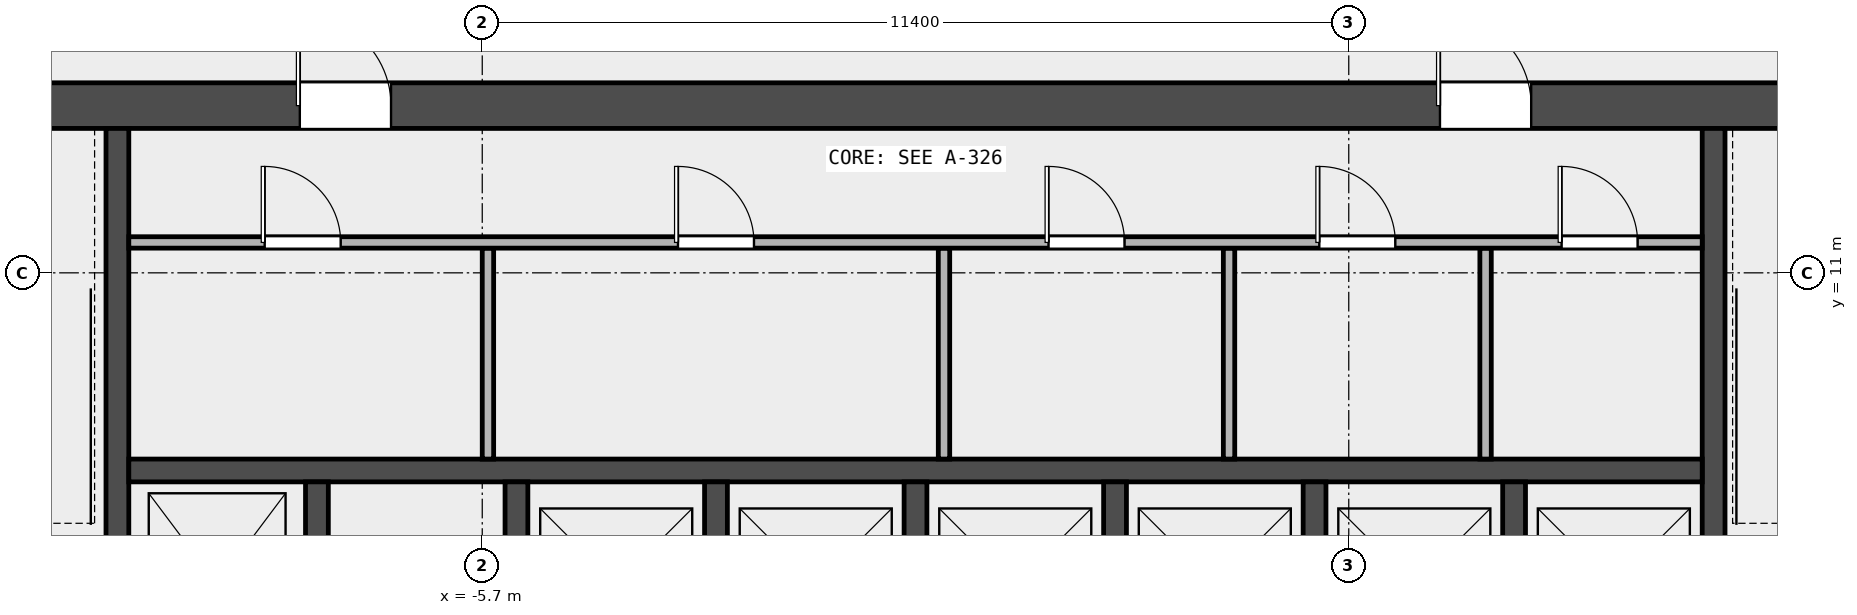
"""IFC4 building model, lengths in metres.
Left out: names, types, materials, properties, quantities, classifications, styles, units other than length and angle.
Written with IfcOpenShell. Run it as: python <this file> out.ifc"""

import sys

from ifc_helpers import new_model, si_unit, direction, frame, frame_2d, origin, place, context, subcontext, project, spatial, rectangle, extrude, element, fill, save


model = new_model("IFC4")
c1 = context("Model", 3, precision=1e-05, world=origin(), true_north=direction((0.0, 1.0)))
c2 = subcontext(c1, "Body", "Model", "MODEL_VIEW")
j1 = project(units=[si_unit("LENGTHUNIT", "METRE"), si_unit("PLANEANGLEUNIT", "RADIAN")], contexts=[c1])
p1 = place(None, origin())
s1 = spatial("IfcSite", under=j1, at=p1, CompositionType="ELEMENT")
p2 = place(p1, origin())
s2 = spatial("IfcBuilding", under=s1, at=p2, CompositionType="ELEMENT")
p3 = place(p2, frame((0.0, 0.0, 271.4)))
s3 = spatial("IfcBuildingStorey", under=s2, at=p3, CompositionType="ELEMENT", Elevation=271.4)
p4 = place(p3, frame((-14.4, 13.2, 0.0), z_axis=(0.0, 0.0, 1.0), x_axis=(1.0, 0.0, 0.0)))
e1 = element("IfcWall", 1, at=p4, inside=s3, PredefinedType="SHEAR", context=c2, shape_type="SweptSolid", body=[
    extrude(rectangle(XDim=28.8, YDim=0.6, at=frame_2d((14.4, 0.0))), origin(), (0.0, 0.0, 1.0), 3.7),
])
p5 = place(p4, frame((6.3, 0.0, 0.0)))
e2 = element("IfcOpeningElement", 2, at=p5, cuts=e1, PredefinedType="OPENING", context=c2, shape_type="SweptSolid", body=[
    extrude(rectangle(XDim=1.2, YDim=2.1, at=frame_2d((0.6, 1.05))), frame((0.0, 0.312, 0.0), z_axis=(0.0, -1.0, 0.0), x_axis=(1.0, 0.0, 0.0)), (0.0, 0.0, 1.0), 0.624),
])
p6 = place(p4, frame((21.3, 0.0, 0.0)))
e3 = element("IfcOpeningElement", 3, at=p6, cuts=e1, PredefinedType="OPENING", context=c2, shape_type="SweptSolid", body=[
    extrude(rectangle(XDim=1.2, YDim=2.1, at=frame_2d((0.6, 1.05))), frame((0.0, 0.312, 0.0), z_axis=(0.0, -1.0, 0.0), x_axis=(1.0, 0.0, 0.0)), (0.0, 0.0, 1.0), 0.624),
])
for number, where, z_axis, x_axis in (
    (4, (-10.5, 5.25, 0.0), (0.0, 0.0, 1.0), (0.0, 1.0, 0.0)),
    (5, (10.5, 5.25, 0.0), (0.0, 0.0, 1.0), (0.0, 1.0, 0.0)),
):
    element("IfcWall", number, at=place(p3, frame(where, z_axis=z_axis, x_axis=x_axis)), inside=s3, PredefinedType="SHEAR", context=c2, shape_type="SweptSolid", body=[
        extrude(rectangle(XDim=7.65, YDim=0.3, at=frame_2d((3.825, 0.0))), origin(), (0.0, 0.0, 1.0), 3.7),
    ])
p7 = place(p3, frame((-10.35, 8.4, 0.0), z_axis=(0.0, 0.0, 1.0), x_axis=(1.0, 0.0, 0.0)))
e6 = element("IfcWall", 6, at=p7, inside=s3, PredefinedType="SOLIDWALL", context=c2, shape_type="SweptSolid", body=[
    extrude(rectangle(XDim=20.7, YDim=0.3, at=frame_2d((10.35, 0.0))), origin(), (0.0, 0.0, 1.0), 3.7),
])
for number, where, z_axis, x_axis in (
    (7, (-7.875, 5.55, 0.0), (0.0, 0.0, 1.0), (0.0, 1.0, 0.0)),
    (8, (-5.25, 5.55, 0.0), (0.0, 0.0, 1.0), (0.0, 1.0, 0.0)),
    (9, (-2.625, 5.55, 0.0), (0.0, 0.0, 1.0), (0.0, 1.0, 0.0)),
    (10, (0.0, 5.55, 0.0), (0.0, 0.0, 1.0), (0.0, 1.0, 0.0)),
    (11, (2.625, 5.55, 0.0), (0.0, 0.0, 1.0), (0.0, 1.0, 0.0)),
    (12, (5.25, 5.55, 0.0), (0.0, 0.0, 1.0), (0.0, 1.0, 0.0)),
    (13, (7.875, 5.55, 0.0), (0.0, 0.0, 1.0), (0.0, 1.0, 0.0)),
):
    element("IfcWall", number, at=place(p3, frame(where, z_axis=z_axis, x_axis=x_axis)), inside=s3, PredefinedType="SOLIDWALL", context=c2, shape_type="SweptSolid", body=[
        extrude(rectangle(XDim=2.7, YDim=0.3, at=frame_2d((1.35, 0.0))), origin(), (0.0, 0.0, 1.0), 3.7),
    ])
for number, where, z_axis, x_axis in (
    (14, (-5.625, 8.55, 0.0), (0.0, 0.0, 1.0), (0.0, 1.0, 0.0)),
    (15, (0.375, 8.55, 0.0), (0.0, 0.0, 1.0), (0.0, 1.0, 0.0)),
    (16, (4.125, 8.55, 0.0), (0.0, 0.0, 1.0), (0.0, 1.0, 0.0)),
    (17, (7.5, 8.55, 0.0), (0.0, 0.0, 1.0), (0.0, 1.0, 0.0)),
):
    element("IfcWall", number, at=place(p3, frame(where, z_axis=z_axis, x_axis=x_axis)), inside=s3, PredefinedType="PARTITIONING", context=c2, shape_type="SweptSolid", body=[
        extrude(rectangle(XDim=2.775, YDim=0.15, at=frame_2d((1.387, 0.0))), origin(), (0.0, 0.0, 1.0), 3.7),
    ])
p8 = place(p3, frame((-10.35, 11.4, 0.0), z_axis=(0.0, 0.0, 1.0), x_axis=(1.0, 0.0, 0.0)))
e18 = element("IfcWall", 18, at=p8, inside=s3, PredefinedType="PARTITIONING", context=c2, shape_type="SweptSolid", body=[
    extrude(rectangle(XDim=20.7, YDim=0.15, at=frame_2d((10.35, 0.0))), origin(), (0.0, 0.0, 1.0), 3.7),
])
p9 = place(p8, frame((1.788, 0.0, 0.0)))
e19 = element("IfcOpeningElement", 19, at=p9, cuts=e18, PredefinedType="OPENING", context=c2, shape_type="SweptSolid", body=[
    extrude(rectangle(XDim=1.0, YDim=2.1, at=frame_2d((0.5, 1.05))), frame((0.0, 0.087, 0.0), z_axis=(0.0, -1.0, 0.0), x_axis=(1.0, 0.0, 0.0)), (0.0, 0.0, 1.0), 0.174),
])
p10 = place(p8, frame((7.225, 0.0, 0.0)))
e20 = element("IfcOpeningElement", 20, at=p10, cuts=e18, PredefinedType="OPENING", context=c2, shape_type="SweptSolid", body=[
    extrude(rectangle(XDim=1.0, YDim=2.1, at=frame_2d((0.5, 1.05))), frame((0.0, 0.087, 0.0), z_axis=(0.0, -1.0, 0.0), x_axis=(1.0, 0.0, 0.0)), (0.0, 0.0, 1.0), 0.174),
])
p11 = place(p8, frame((12.1, 0.0, 0.0)))
e21 = element("IfcOpeningElement", 21, at=p11, cuts=e18, PredefinedType="OPENING", context=c2, shape_type="SweptSolid", body=[
    extrude(rectangle(XDim=1.0, YDim=2.1, at=frame_2d((0.5, 1.05))), frame((0.0, 0.087, 0.0), z_axis=(0.0, -1.0, 0.0), x_axis=(1.0, 0.0, 0.0)), (0.0, 0.0, 1.0), 0.174),
])
p12 = place(p8, frame((15.663, 0.0, 0.0)))
e22 = element("IfcOpeningElement", 22, at=p12, cuts=e18, PredefinedType="OPENING", context=c2, shape_type="SweptSolid", body=[
    extrude(rectangle(XDim=1.0, YDim=2.1, at=frame_2d((0.5, 1.05))), frame((0.0, 0.087, 0.0), z_axis=(0.0, -1.0, 0.0), x_axis=(1.0, 0.0, 0.0)), (0.0, 0.0, 1.0), 0.174),
])
p13 = place(p8, frame((18.85, 0.0, 0.0)))
e23 = element("IfcOpeningElement", 23, at=p13, cuts=e18, PredefinedType="OPENING", context=c2, shape_type="SweptSolid", body=[
    extrude(rectangle(XDim=1.0, YDim=2.1, at=frame_2d((0.5, 1.05))), frame((0.0, 0.087, 0.0), z_axis=(0.0, -1.0, 0.0), x_axis=(1.0, 0.0, 0.0)), (0.0, 0.0, 1.0), 0.174),
])
p14 = place(p9, origin())
e24 = element("IfcDoor", 24, at=p14, inside=s3, OperationType="SINGLE_SWING_LEFT", PredefinedType="DOOR", context=c2, shape_type="SweptSolid", body=[
    extrude(rectangle(XDim=1.0, YDim=2.1, at=frame_2d((0.5, 1.05))), frame((0.0, 0.025, 0.0), z_axis=(0.0, -1.0, 0.0), x_axis=(1.0, 0.0, 0.0)), (0.0, 0.0, 1.0), 0.05),
])
fill(e19, e24)
p15 = place(p10, origin())
e25 = element("IfcDoor", 25, at=p15, inside=s3, OperationType="SINGLE_SWING_LEFT", PredefinedType="DOOR", context=c2, shape_type="SweptSolid", body=[
    extrude(rectangle(XDim=1.0, YDim=2.1, at=frame_2d((0.5, 1.05))), frame((0.0, 0.025, 0.0), z_axis=(0.0, -1.0, 0.0), x_axis=(1.0, 0.0, 0.0)), (0.0, 0.0, 1.0), 0.05),
])
fill(e20, e25)
p16 = place(p11, origin())
e26 = element("IfcDoor", 26, at=p16, inside=s3, OperationType="SINGLE_SWING_LEFT", PredefinedType="DOOR", context=c2, shape_type="SweptSolid", body=[
    extrude(rectangle(XDim=1.0, YDim=2.1, at=frame_2d((0.5, 1.05))), frame((0.0, 0.025, 0.0), z_axis=(0.0, -1.0, 0.0), x_axis=(1.0, 0.0, 0.0)), (0.0, 0.0, 1.0), 0.05),
])
fill(e21, e26)
p17 = place(p12, origin())
e27 = element("IfcDoor", 27, at=p17, inside=s3, OperationType="SINGLE_SWING_LEFT", PredefinedType="DOOR", context=c2, shape_type="SweptSolid", body=[
    extrude(rectangle(XDim=1.0, YDim=2.1, at=frame_2d((0.5, 1.05))), frame((0.0, 0.025, 0.0), z_axis=(0.0, -1.0, 0.0), x_axis=(1.0, 0.0, 0.0)), (0.0, 0.0, 1.0), 0.05),
])
fill(e22, e27)
p18 = place(p13, origin())
e28 = element("IfcDoor", 28, at=p18, inside=s3, OperationType="SINGLE_SWING_LEFT", PredefinedType="DOOR", context=c2, shape_type="SweptSolid", body=[
    extrude(rectangle(XDim=1.0, YDim=2.1, at=frame_2d((0.5, 1.05))), frame((0.0, 0.025, 0.0), z_axis=(0.0, -1.0, 0.0), x_axis=(1.0, 0.0, 0.0)), (0.0, 0.0, 1.0), 0.05),
])
fill(e23, e28)
p19 = place(p5, origin())
e29 = element("IfcDoor", 29, at=p19, inside=s3, OperationType="SINGLE_SWING_LEFT", PredefinedType="DOOR", context=c2, shape_type="SweptSolid", body=[
    extrude(rectangle(XDim=1.2, YDim=2.1, at=frame_2d((0.6, 1.05))), frame((0.0, 0.025, 0.0), z_axis=(0.0, -1.0, 0.0), x_axis=(1.0, 0.0, 0.0)), (0.0, 0.0, 1.0), 0.05),
])
fill(e2, e29)
p20 = place(p6, origin())
e30 = element("IfcDoor", 30, at=p20, inside=s3, OperationType="SINGLE_SWING_RIGHT", PredefinedType="DOOR", context=c2, shape_type="SweptSolid", body=[
    extrude(rectangle(XDim=1.2, YDim=2.1, at=frame_2d((0.6, 1.05))), frame((0.0, 0.025, 0.0), z_axis=(0.0, -1.0, 0.0), x_axis=(1.0, 0.0, 0.0)), (0.0, 0.0, 1.0), 0.05),
])
fill(e3, e30)
save(model, sys.argv[1])
